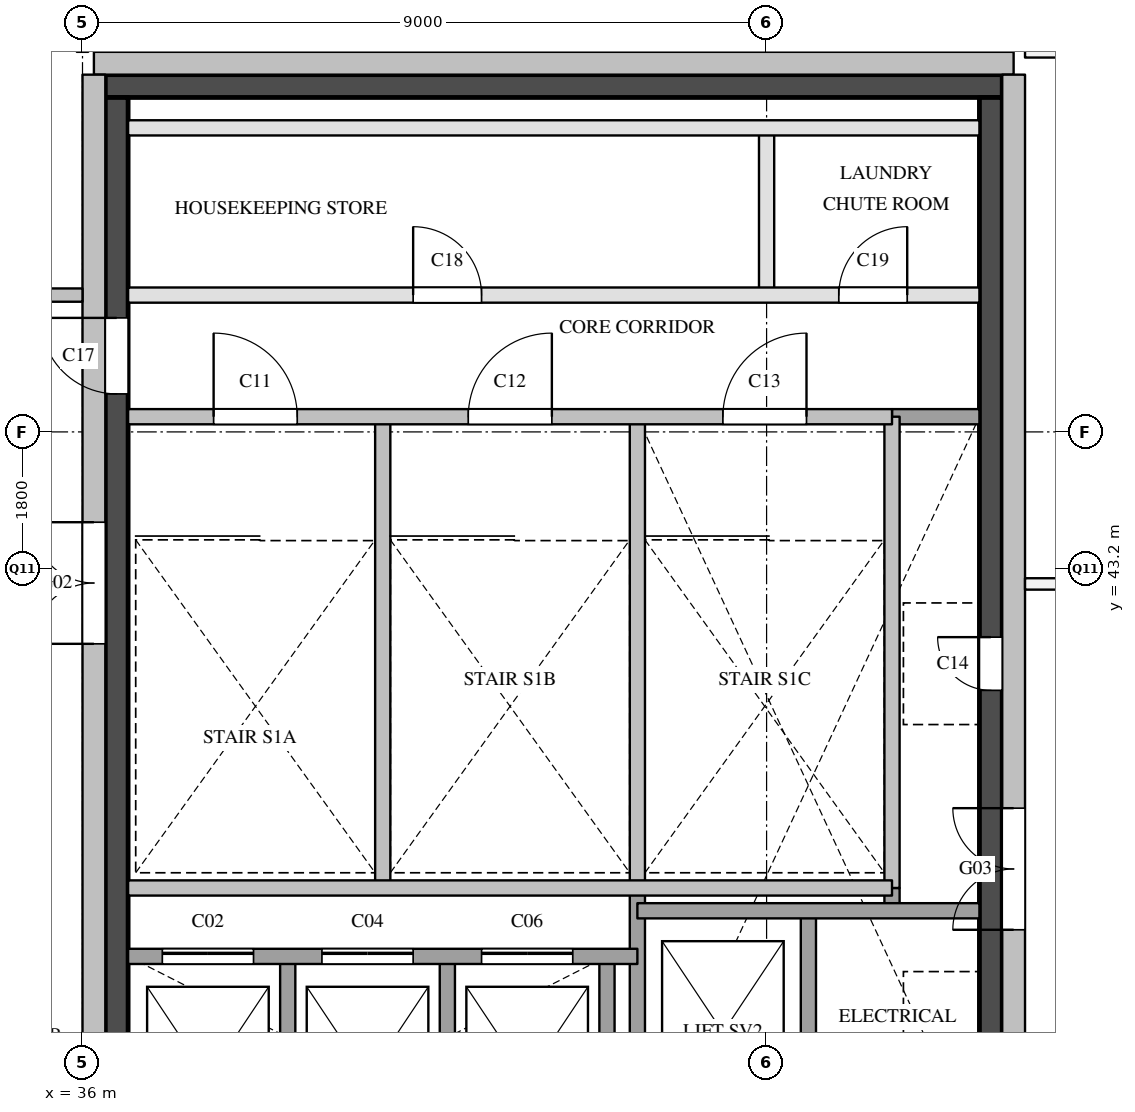
"""IFC4 building model, lengths in metres.
Left out: names, types, materials, properties, quantities, classifications, styles, units other than length and angle.
Written with IfcOpenShell. Run it as: python <this file> out.ifc"""

import sys

from ifc_helpers import new_model, si_unit, direction, frame, frame_2d, origin, place, context, subcontext, project, spatial, rectangle, extrude, element, fill, save


model = new_model("IFC4")
c1 = context("Model", 3, precision=1e-05, world=origin(), true_north=direction((0.0, 1.0)))
c2 = subcontext(c1, "Body", "Model", "MODEL_VIEW")
j1 = project(units=[si_unit("LENGTHUNIT", "METRE"), si_unit("PLANEANGLEUNIT", "RADIAN")], contexts=[c1])
p1 = place(None, origin())
s1 = spatial("IfcSite", under=j1, at=p1, CompositionType="ELEMENT")
p2 = place(p1, origin())
s2 = spatial("IfcBuilding", under=s1, at=p2, CompositionType="ELEMENT")
p3 = place(p2, frame((0.0, 0.0, 320.7)))
s3 = spatial("IfcBuildingStorey", under=s2, at=p3, CompositionType="ELEMENT", Elevation=320.7)
p4 = place(p3, frame((36.15, 49.85, 4.5), z_axis=(0.0, 0.0, 1.0), x_axis=(1.0, 0.0, 0.0)))
e1 = element("IfcWall", 1, at=p4, inside=s3, PredefinedType="SOLIDWALL", context=c2, shape_type="SweptSolid", body=[
    extrude(rectangle(XDim=12.1, YDim=0.3, at=frame_2d((6.05, 0.0))), origin(), (0.0, 0.0, 1.0), 3.6),
])
p5 = place(p3, frame((36.15, 28.8, 4.5), z_axis=(0.0, 0.0, 1.0), x_axis=(0.0, 1.0, 0.0)))
e2 = element("IfcWall", 2, at=p5, inside=s3, PredefinedType="SOLIDWALL", context=c2, shape_type="SweptSolid", body=[
    extrude(rectangle(XDim=20.9, YDim=0.3, at=frame_2d((10.45, 0.0))), origin(), (0.0, 0.0, 1.0), 3.6),
])
p6 = place(p5, frame((5.47, 0.0, 0.0)))
e3 = element("IfcOpeningElement", 3, at=p6, cuts=e2, PredefinedType="OPENING", context=c2, shape_type="SweptSolid", body=[
    extrude(rectangle(XDim=1.6, YDim=2.4, at=frame_2d((0.8, 1.2))), frame((0.0, 0.16, 0.0), z_axis=(0.0, -1.0, 0.0), x_axis=(1.0, 0.0, 0.0)), (0.0, 0.0, 1.0), 0.32),
])
p7 = place(p5, frame((13.412, 0.0, 0.0)))
e4 = element("IfcOpeningElement", 4, at=p7, cuts=e2, PredefinedType="OPENING", context=c2, shape_type="SweptSolid", body=[
    extrude(rectangle(XDim=1.6, YDim=2.4, at=frame_2d((0.8, 1.2))), frame((0.0, 0.16, 0.0), z_axis=(0.0, -1.0, 0.0), x_axis=(1.0, 0.0, 0.0)), (0.0, 0.0, 1.0), 0.32),
])
p8 = place(p3, frame((48.25, 28.8, 4.5), z_axis=(0.0, 0.0, 1.0), x_axis=(0.0, 1.0, 0.0)))
e5 = element("IfcWall", 5, at=p8, inside=s3, PredefinedType="SOLIDWALL", context=c2, shape_type="SweptSolid", body=[
    extrude(rectangle(XDim=20.9, YDim=0.3, at=frame_2d((10.45, 0.0))), origin(), (0.0, 0.0, 1.0), 3.6),
])
p9 = place(p8, frame((9.65, 0.0, 0.0)))
e6 = element("IfcOpeningElement", 6, at=p9, cuts=e5, PredefinedType="OPENING", context=c2, shape_type="SweptSolid", body=[
    extrude(rectangle(XDim=1.6, YDim=2.4, at=frame_2d((0.8, 1.2))), frame((0.0, 0.16, 0.0), z_axis=(0.0, -1.0, 0.0), x_axis=(1.0, 0.0, 0.0)), (0.0, 0.0, 1.0), 0.32),
])
p10 = place(p3, frame((36.3, 49.55, 0.0), z_axis=(0.0, 0.0, 1.0), x_axis=(1.0, 0.0, 0.0)))
e7 = element("IfcWall", 7, at=p10, inside=s3, PredefinedType="SHEAR", context=c2, shape_type="SweptSolid", body=[
    extrude(rectangle(XDim=11.8, YDim=0.3, at=frame_2d((5.9, 0.0))), origin(), (0.0, 0.0, 1.0), 3.95),
])
p11 = place(p3, frame((36.45, 29.1, 0.0), z_axis=(0.0, 0.0, 1.0), x_axis=(0.0, 1.0, 0.0)))
e8 = element("IfcWall", 8, at=p11, inside=s3, PredefinedType="SHEAR", context=c2, shape_type="SweptSolid", body=[
    extrude(rectangle(XDim=20.3, YDim=0.3, at=frame_2d((10.15, 0.0))), origin(), (0.0, 0.0, 1.0), 3.95),
])
p12 = place(p11, frame((3.6, 0.0, 0.0)))
e9 = element("IfcOpeningElement", 9, at=p12, cuts=e8, PredefinedType="OPENING", context=c2, shape_type="SweptSolid", body=[
    extrude(rectangle(XDim=1.8, YDim=2.1, at=frame_2d((0.9, 1.05))), frame((0.0, 0.16, 0.0), z_axis=(0.0, -1.0, 0.0), x_axis=(1.0, 0.0, 0.0)), (0.0, 0.0, 1.0), 0.32),
])
p13 = place(p11, frame((16.4, 0.0, 0.0)))
e10 = element("IfcOpeningElement", 10, at=p13, cuts=e8, PredefinedType="OPENING", context=c2, shape_type="SweptSolid", body=[
    extrude(rectangle(XDim=1.0, YDim=2.1, at=frame_2d((0.5, 1.05))), frame((0.0, 0.16, 0.0), z_axis=(0.0, -1.0, 0.0), x_axis=(1.0, 0.0, 0.0)), (0.0, 0.0, 1.0), 0.32),
])
p14 = place(p3, frame((47.95, 29.1, 0.0), z_axis=(0.0, 0.0, 1.0), x_axis=(0.0, 1.0, 0.0)))
e11 = element("IfcWall", 11, at=p14, inside=s3, PredefinedType="SHEAR", context=c2, shape_type="SweptSolid", body=[
    extrude(rectangle(XDim=20.3, YDim=0.3, at=frame_2d((10.15, 0.0))), origin(), (0.0, 0.0, 1.0), 3.95),
])
p15 = place(p14, frame((12.5, 0.0, 0.0)))
e12 = element("IfcOpeningElement", 12, at=p15, cuts=e11, PredefinedType="OPENING", context=c2, shape_type="SweptSolid", body=[
    extrude(rectangle(XDim=0.7, YDim=2.1, at=frame_2d((0.35, 1.05))), frame((0.0, 0.16, 0.0), z_axis=(0.0, -1.0, 0.0), x_axis=(1.0, 0.0, 0.0)), (0.0, 0.0, 1.0), 0.32),
])
p16 = place(p3, frame((38.7, 34.9, 0.0), z_axis=(0.0, 0.0, 1.0), x_axis=(0.0, 1.0, 0.0)))
e13 = element("IfcWall", 13, at=p16, inside=s3, PredefinedType="SOLIDWALL", context=c2, shape_type="SweptSolid", body=[
    extrude(rectangle(XDim=3.2, YDim=0.2, at=frame_2d((1.6, 0.0))), origin(), (0.0, 0.0, 1.0), 3.95),
])
p17 = place(p3, frame((39.95, 39.0, 0.0), z_axis=(0.0, 0.0, 1.0), x_axis=(0.0, 1.0, 0.0)))
e14 = element("IfcWall", 14, at=p17, inside=s3, PredefinedType="SOLIDWALL", context=c2, shape_type="SweptSolid", body=[
    extrude(rectangle(XDim=6.2, YDim=0.2, at=frame_2d((3.1, 0.0))), origin(), (0.0, 0.0, 1.0), 3.95),
])
for number, where, z_axis, x_axis in (
    (15, (40.8, 34.9, 0.0), (0.0, 0.0, 1.0), (0.0, 1.0, 0.0)),
    (16, (42.9, 34.9, 0.0), (0.0, 0.0, 1.0), (0.0, 1.0, 0.0)),
):
    element("IfcWall", number, at=place(p3, frame(where, z_axis=z_axis, x_axis=x_axis)), inside=s3, PredefinedType="SOLIDWALL", context=c2, shape_type="SweptSolid", body=[
        extrude(rectangle(XDim=3.2, YDim=0.2, at=frame_2d((1.6, 0.0))), origin(), (0.0, 0.0, 1.0), 3.95),
    ])
p18 = place(p3, frame((43.3, 29.1, 0.0), z_axis=(0.0, 0.0, 1.0), x_axis=(0.0, 1.0, 0.0)))
e17 = element("IfcWall", 17, at=p18, inside=s3, PredefinedType="SOLIDWALL", context=c2, shape_type="SweptSolid", body=[
    extrude(rectangle(XDim=9.9, YDim=0.2, at=frame_2d((4.95, 0.0))), origin(), (0.0, 0.0, 1.0), 3.95),
])
p19 = place(p18, frame((3.6, 0.0, 0.0)))
e18 = element("IfcOpeningElement", 18, at=p19, cuts=e17, PredefinedType="OPENING", context=c2, shape_type="SweptSolid", body=[
    extrude(rectangle(XDim=1.8, YDim=2.1, at=frame_2d((0.9, 1.05))), frame((0.0, 0.11, 0.0), z_axis=(0.0, -1.0, 0.0), x_axis=(1.0, 0.0, 0.0)), (0.0, 0.0, 1.0), 0.22),
])
p20 = place(p3, frame((43.3, 39.0, 0.0), z_axis=(0.0, 0.0, 1.0), x_axis=(0.0, 1.0, 0.0)))
e19 = element("IfcWall", 19, at=p20, inside=s3, PredefinedType="SOLIDWALL", context=c2, shape_type="SweptSolid", body=[
    extrude(rectangle(XDim=6.2, YDim=0.2, at=frame_2d((3.1, 0.0))), origin(), (0.0, 0.0, 1.0), 3.95),
])
p21 = place(p3, frame((45.0, 46.8, 0.0), z_axis=(0.0, 0.0, 1.0), x_axis=(0.0, 1.0, 0.0)))
e20 = element("IfcWall", 20, at=p21, inside=s3, PredefinedType="PARTITIONING", context=c2, shape_type="SweptSolid", body=[
    extrude(rectangle(XDim=2.2, YDim=0.2, at=frame_2d((1.1, 0.0))), origin(), (0.0, 0.0, 1.0), 3.95),
])
p22 = place(p3, frame((45.55, 35.5, 0.0), z_axis=(0.0, 0.0, 1.0), x_axis=(0.0, 1.0, 0.0)))
e21 = element("IfcWall", 21, at=p22, inside=s3, PredefinedType="SOLIDWALL", context=c2, shape_type="SweptSolid", body=[
    extrude(rectangle(XDim=3.2, YDim=0.2, at=frame_2d((1.6, 0.0))), origin(), (0.0, 0.0, 1.0), 3.95),
])
p23 = place(p3, frame((46.65, 38.7, 0.0), z_axis=(0.0, 0.0, 1.0), x_axis=(0.0, 1.0, 0.0)))
e22 = element("IfcWall", 22, at=p23, inside=s3, PredefinedType="SOLIDWALL", context=c2, shape_type="SweptSolid", body=[
    extrude(rectangle(XDim=0.3, YDim=0.2, at=frame_2d((0.15, 0.0))), origin(), (0.0, 0.0, 1.0), 3.95),
])
p24 = place(p3, frame((46.65, 39.0, 0.0), z_axis=(0.0, 0.0, 1.0), x_axis=(0.0, 1.0, 0.0)))
e23 = element("IfcWall", 23, at=p24, inside=s3, PredefinedType="SOLIDWALL", context=c2, shape_type="SweptSolid", body=[
    extrude(rectangle(XDim=6.2, YDim=0.2, at=frame_2d((3.1, 0.0))), origin(), (0.0, 0.0, 1.0), 3.95),
])
p25 = place(p3, frame((36.6, 38.1, 0.0), z_axis=(0.0, 0.0, 1.0), x_axis=(1.0, 0.0, 0.0)))
e24 = element("IfcWall", 24, at=p25, inside=s3, PredefinedType="SOLIDWALL", context=c2, shape_type="SweptSolid", body=[
    extrude(rectangle(XDim=6.7, YDim=0.2, at=frame_2d((3.35, 0.0))), origin(), (0.0, 0.0, 1.0), 3.95),
])
p26 = place(p25, frame((0.45, 0.0, 0.0)))
e25 = element("IfcOpeningElement", 25, at=p26, cuts=e24, PredefinedType="OPENING", context=c2, shape_type="SweptSolid", body=[
    extrude(rectangle(XDim=1.2, YDim=2.1, at=frame_2d((0.6, 1.05))), frame((0.0, 0.11, 0.0), z_axis=(0.0, -1.0, 0.0), x_axis=(1.0, 0.0, 0.0)), (0.0, 0.0, 1.0), 0.22),
])
p27 = place(p25, frame((2.55, 0.0, 0.0)))
e26 = element("IfcOpeningElement", 26, at=p27, cuts=e24, PredefinedType="OPENING", context=c2, shape_type="SweptSolid", body=[
    extrude(rectangle(XDim=1.2, YDim=2.1, at=frame_2d((0.6, 1.05))), frame((0.0, 0.11, 0.0), z_axis=(0.0, -1.0, 0.0), x_axis=(1.0, 0.0, 0.0)), (0.0, 0.0, 1.0), 0.22),
])
p28 = place(p25, frame((4.65, 0.0, 0.0)))
e27 = element("IfcOpeningElement", 27, at=p28, cuts=e24, PredefinedType="OPENING", context=c2, shape_type="SweptSolid", body=[
    extrude(rectangle(XDim=1.2, YDim=2.1, at=frame_2d((0.6, 1.05))), frame((0.0, 0.11, 0.0), z_axis=(0.0, -1.0, 0.0), x_axis=(1.0, 0.0, 0.0)), (0.0, 0.0, 1.0), 0.22),
])
p29 = place(p3, frame((43.3, 38.7, 0.0), z_axis=(0.0, 0.0, 1.0), x_axis=(1.0, 0.0, 0.0)))
e28 = element("IfcWall", 28, at=p29, inside=s3, PredefinedType="SOLIDWALL", context=c2, shape_type="SweptSolid", body=[
    extrude(rectangle(XDim=4.5, YDim=0.2, at=frame_2d((2.25, 0.0))), origin(), (0.0, 0.0, 1.0), 3.95),
])
p30 = place(p3, frame((36.6, 39.0, 0.0), z_axis=(0.0, 0.0, 1.0), x_axis=(1.0, 0.0, 0.0)))
e29 = element("IfcWall", 29, at=p30, inside=s3, PredefinedType="SOLIDWALL", context=c2, shape_type="SweptSolid", body=[
    extrude(rectangle(XDim=10.05, YDim=0.2, at=frame_2d((5.025, 0.0))), origin(), (0.0, 0.0, 1.0), 3.95),
])
p31 = place(p3, frame((46.65, 45.2, 0.0), z_axis=(0.0, 0.0, 1.0), x_axis=(1.0, 0.0, 0.0)))
e30 = element("IfcWall", 30, at=p31, inside=s3, PredefinedType="SOLIDWALL", context=c2, shape_type="SweptSolid", body=[
    extrude(rectangle(XDim=1.15, YDim=0.2, at=frame_2d((0.575, 0.0))), origin(), (0.0, 0.0, 1.0), 3.95),
])
p32 = place(p3, frame((36.6, 45.2, 0.0), z_axis=(0.0, 0.0, 1.0), x_axis=(1.0, 0.0, 0.0)))
e31 = element("IfcWall", 31, at=p32, inside=s3, PredefinedType="SOLIDWALL", context=c2, shape_type="SweptSolid", body=[
    extrude(rectangle(XDim=10.05, YDim=0.2, at=frame_2d((5.025, 0.0))), origin(), (0.0, 0.0, 1.0), 3.95),
])
p33 = place(p32, frame((1.125, 0.0, 0.0)))
e32 = element("IfcOpeningElement", 32, at=p33, cuts=e31, PredefinedType="OPENING", context=c2, shape_type="SweptSolid", body=[
    extrude(rectangle(XDim=1.1, YDim=2.1, at=frame_2d((0.55, 1.05))), frame((0.0, 0.11, 0.0), z_axis=(0.0, -1.0, 0.0), x_axis=(1.0, 0.0, 0.0)), (0.0, 0.0, 1.0), 0.22),
])
p34 = place(p32, frame((4.475, 0.0, 0.0)))
e33 = element("IfcOpeningElement", 33, at=p34, cuts=e31, PredefinedType="OPENING", context=c2, shape_type="SweptSolid", body=[
    extrude(rectangle(XDim=1.1, YDim=2.1, at=frame_2d((0.55, 1.05))), frame((0.0, 0.11, 0.0), z_axis=(0.0, -1.0, 0.0), x_axis=(1.0, 0.0, 0.0)), (0.0, 0.0, 1.0), 0.22),
])
p35 = place(p32, frame((7.825, 0.0, 0.0)))
e34 = element("IfcOpeningElement", 34, at=p35, cuts=e31, PredefinedType="OPENING", context=c2, shape_type="SweptSolid", body=[
    extrude(rectangle(XDim=1.1, YDim=2.1, at=frame_2d((0.55, 1.05))), frame((0.0, 0.11, 0.0), z_axis=(0.0, -1.0, 0.0), x_axis=(1.0, 0.0, 0.0)), (0.0, 0.0, 1.0), 0.22),
])
p36 = place(p3, frame((36.6, 46.8, 0.0), z_axis=(0.0, 0.0, 1.0), x_axis=(1.0, 0.0, 0.0)))
e35 = element("IfcWall", 35, at=p36, inside=s3, PredefinedType="PARTITIONING", context=c2, shape_type="SweptSolid", body=[
    extrude(rectangle(XDim=11.2, YDim=0.2, at=frame_2d((5.6, 0.0))), origin(), (0.0, 0.0, 1.0), 3.95),
])
p37 = place(p36, frame((3.75, 0.0, 0.0)))
e36 = element("IfcOpeningElement", 36, at=p37, cuts=e35, PredefinedType="OPENING", context=c2, shape_type="SweptSolid", body=[
    extrude(rectangle(XDim=0.9, YDim=2.1, at=frame_2d((0.45, 1.05))), frame((0.0, 0.11, 0.0), z_axis=(0.0, -1.0, 0.0), x_axis=(1.0, 0.0, 0.0)), (0.0, 0.0, 1.0), 0.22),
])
p38 = place(p36, frame((9.35, 0.0, 0.0)))
e37 = element("IfcOpeningElement", 37, at=p38, cuts=e35, PredefinedType="OPENING", context=c2, shape_type="SweptSolid", body=[
    extrude(rectangle(XDim=0.9, YDim=2.1, at=frame_2d((0.45, 1.05))), frame((0.0, 0.11, 0.0), z_axis=(0.0, -1.0, 0.0), x_axis=(1.0, 0.0, 0.0)), (0.0, 0.0, 1.0), 0.22),
])
p39 = place(p3, frame((36.6, 49.0, 0.0), z_axis=(0.0, 0.0, 1.0), x_axis=(1.0, 0.0, 0.0)))
e38 = element("IfcWall", 38, at=p39, inside=s3, PredefinedType="PARTITIONING", context=c2, shape_type="SweptSolid", body=[
    extrude(rectangle(XDim=11.2, YDim=0.2, at=frame_2d((5.6, 0.0))), origin(), (0.0, 0.0, 1.0), 3.95),
])
p40 = place(p3, frame((34.2, 46.8, 0.0), z_axis=(0.0, 0.0, 1.0), x_axis=(1.0, 0.0, 0.0)))
e39 = element("IfcWall", 39, at=p40, inside=s3, PredefinedType="PARTITIONING", context=c2, shape_type="SweptSolid", body=[
    extrude(rectangle(XDim=1.8, YDim=0.175, at=frame_2d((0.9, 0.0))), origin(), (0.0, 0.0, 1.0), 3.95),
])
p41 = place(p3, frame((48.4, 43.0, 0.0), z_axis=(0.0, 0.0, 1.0), x_axis=(1.0, 0.0, 0.0)))
e40 = element("IfcWall", 40, at=p41, inside=s3, PredefinedType="PARTITIONING", context=c2, shape_type="SweptSolid", body=[
    extrude(rectangle(XDim=5.6, YDim=0.15, at=frame_2d((2.8, 0.0))), origin(), (0.0, 0.0, 1.0), 2.95),
])
p42 = place(p41, frame((2.3, 0.0, 0.0)))
e41 = element("IfcOpeningElement", 41, at=p42, cuts=e40, PredefinedType="OPENING", context=c2, shape_type="SweptSolid", body=[
    extrude(rectangle(XDim=1.0, YDim=2.1, at=frame_2d((0.5, 1.05))), frame((0.0, 0.085, 0.0), z_axis=(0.0, -1.0, 0.0), x_axis=(1.0, 0.0, 0.0)), (0.0, 0.0, 1.0), 0.17),
])
p43 = place(p3, frame((48.4, 50.0, 0.0), z_axis=(0.0, 0.0, 1.0), x_axis=(1.0, 0.0, 0.0)))
e42 = element("IfcWall", 42, at=p43, inside=s3, PredefinedType="PARTITIONING", context=c2, shape_type="SweptSolid", body=[
    extrude(rectangle(XDim=5.5, YDim=0.15, at=frame_2d((2.75, 0.0))), origin(), (0.0, 0.0, 1.0), 2.95),
])
p44 = place(p43, frame((2.25, 0.0, 0.0)))
e43 = element("IfcOpeningElement", 43, at=p44, cuts=e42, PredefinedType="OPENING", context=c2, shape_type="SweptSolid", body=[
    extrude(rectangle(XDim=1.0, YDim=2.1, at=frame_2d((0.5, 1.05))), frame((0.0, 0.085, 0.0), z_axis=(0.0, -1.0, 0.0), x_axis=(1.0, 0.0, 0.0)), (0.0, 0.0, 1.0), 0.17),
])
p45 = place(p7, origin())
e44 = element("IfcDoor", 44, at=p45, inside=s3, OperationType="DOUBLE_DOOR_SINGLE_SWING", PredefinedType="DOOR", context=c2, shape_type="SweptSolid", body=[
    extrude(rectangle(XDim=1.6, YDim=2.4, at=frame_2d((0.8, 1.2))), frame((0.0, 0.025, 0.0), z_axis=(0.0, -1.0, 0.0), x_axis=(1.0, 0.0, 0.0)), (0.0, 0.0, 1.0), 0.05),
])
fill(e4, e44)
p46 = place(p9, origin())
e45 = element("IfcDoor", 45, at=p46, inside=s3, OperationType="DOUBLE_DOOR_SINGLE_SWING", PredefinedType="DOOR", context=c2, shape_type="SweptSolid", body=[
    extrude(rectangle(XDim=1.6, YDim=2.4, at=frame_2d((0.8, 1.2))), frame((0.0, 0.025, 0.0), z_axis=(0.0, -1.0, 0.0), x_axis=(1.0, 0.0, 0.0)), (0.0, 0.0, 1.0), 0.05),
])
fill(e6, e45)
p47 = place(p26, origin())
e46 = element("IfcDoor", 46, at=p47, inside=s3, OperationType="SLIDING_TO_LEFT", PredefinedType="DOOR", context=c2, shape_type="SweptSolid", body=[
    extrude(rectangle(XDim=1.2, YDim=2.1, at=frame_2d((0.6, 1.05))), frame((0.0, 0.025, 0.0), z_axis=(0.0, -1.0, 0.0), x_axis=(1.0, 0.0, 0.0)), (0.0, 0.0, 1.0), 0.05),
])
fill(e25, e46)
p48 = place(p27, origin())
e47 = element("IfcDoor", 47, at=p48, inside=s3, OperationType="SLIDING_TO_LEFT", PredefinedType="DOOR", context=c2, shape_type="SweptSolid", body=[
    extrude(rectangle(XDim=1.2, YDim=2.1, at=frame_2d((0.6, 1.05))), frame((0.0, 0.025, 0.0), z_axis=(0.0, -1.0, 0.0), x_axis=(1.0, 0.0, 0.0)), (0.0, 0.0, 1.0), 0.05),
])
fill(e26, e47)
p49 = place(p28, origin())
e48 = element("IfcDoor", 48, at=p49, inside=s3, OperationType="SLIDING_TO_LEFT", PredefinedType="DOOR", context=c2, shape_type="SweptSolid", body=[
    extrude(rectangle(XDim=1.2, YDim=2.1, at=frame_2d((0.6, 1.05))), frame((0.0, 0.025, 0.0), z_axis=(0.0, -1.0, 0.0), x_axis=(1.0, 0.0, 0.0)), (0.0, 0.0, 1.0), 0.05),
])
fill(e27, e48)
p50 = place(p33, origin())
e49 = element("IfcDoor", 49, at=p50, inside=s3, OperationType="SINGLE_SWING_LEFT", PredefinedType="DOOR", context=c2, shape_type="SweptSolid", body=[
    extrude(rectangle(XDim=1.1, YDim=2.1, at=frame_2d((0.55, 1.05))), frame((0.0, 0.025, 0.0), z_axis=(0.0, -1.0, 0.0), x_axis=(1.0, 0.0, 0.0)), (0.0, 0.0, 1.0), 0.05),
])
fill(e32, e49)
p51 = place(p34, origin())
e50 = element("IfcDoor", 50, at=p51, inside=s3, OperationType="SINGLE_SWING_RIGHT", PredefinedType="DOOR", context=c2, shape_type="SweptSolid", body=[
    extrude(rectangle(XDim=1.1, YDim=2.1, at=frame_2d((0.55, 1.05))), frame((0.0, 0.025, 0.0), z_axis=(0.0, -1.0, 0.0), x_axis=(1.0, 0.0, 0.0)), (0.0, 0.0, 1.0), 0.05),
])
fill(e33, e50)
p52 = place(p35, origin())
e51 = element("IfcDoor", 51, at=p52, inside=s3, OperationType="SINGLE_SWING_RIGHT", PredefinedType="DOOR", context=c2, shape_type="SweptSolid", body=[
    extrude(rectangle(XDim=1.1, YDim=2.1, at=frame_2d((0.55, 1.05))), frame((0.0, 0.025, 0.0), z_axis=(0.0, -1.0, 0.0), x_axis=(1.0, 0.0, 0.0)), (0.0, 0.0, 1.0), 0.05),
])
fill(e34, e51)
p53 = place(p15, origin())
e52 = element("IfcDoor", 52, at=p53, inside=s3, OperationType="SINGLE_SWING_RIGHT", PredefinedType="DOOR", context=c2, shape_type="SweptSolid", body=[
    extrude(rectangle(XDim=0.7, YDim=2.1, at=frame_2d((0.35, 1.05))), frame((0.0, 0.025, 0.0), z_axis=(0.0, -1.0, 0.0), x_axis=(1.0, 0.0, 0.0)), (0.0, 0.0, 1.0), 0.05),
])
fill(e12, e52)
p54 = place(p13, origin())
e53 = element("IfcDoor", 53, at=p54, inside=s3, OperationType="SINGLE_SWING_RIGHT", PredefinedType="DOOR", context=c2, shape_type="SweptSolid", body=[
    extrude(rectangle(XDim=1.0, YDim=2.1, at=frame_2d((0.5, 1.05))), frame((0.0, 0.025, 0.0), z_axis=(0.0, -1.0, 0.0), x_axis=(1.0, 0.0, 0.0)), (0.0, 0.0, 1.0), 0.05),
])
fill(e10, e53)
p55 = place(p37, origin())
e54 = element("IfcDoor", 54, at=p55, inside=s3, OperationType="SINGLE_SWING_LEFT", PredefinedType="DOOR", context=c2, shape_type="SweptSolid", body=[
    extrude(rectangle(XDim=0.9, YDim=2.1, at=frame_2d((0.45, 1.05))), frame((0.0, 0.025, 0.0), z_axis=(0.0, -1.0, 0.0), x_axis=(1.0, 0.0, 0.0)), (0.0, 0.0, 1.0), 0.05),
])
fill(e36, e54)
p56 = place(p38, origin())
e55 = element("IfcDoor", 55, at=p56, inside=s3, OperationType="SINGLE_SWING_RIGHT", PredefinedType="DOOR", context=c2, shape_type="SweptSolid", body=[
    extrude(rectangle(XDim=0.9, YDim=2.1, at=frame_2d((0.45, 1.05))), frame((0.0, 0.025, 0.0), z_axis=(0.0, -1.0, 0.0), x_axis=(1.0, 0.0, 0.0)), (0.0, 0.0, 1.0), 0.05),
])
fill(e37, e55)
save(model, sys.argv[1])
